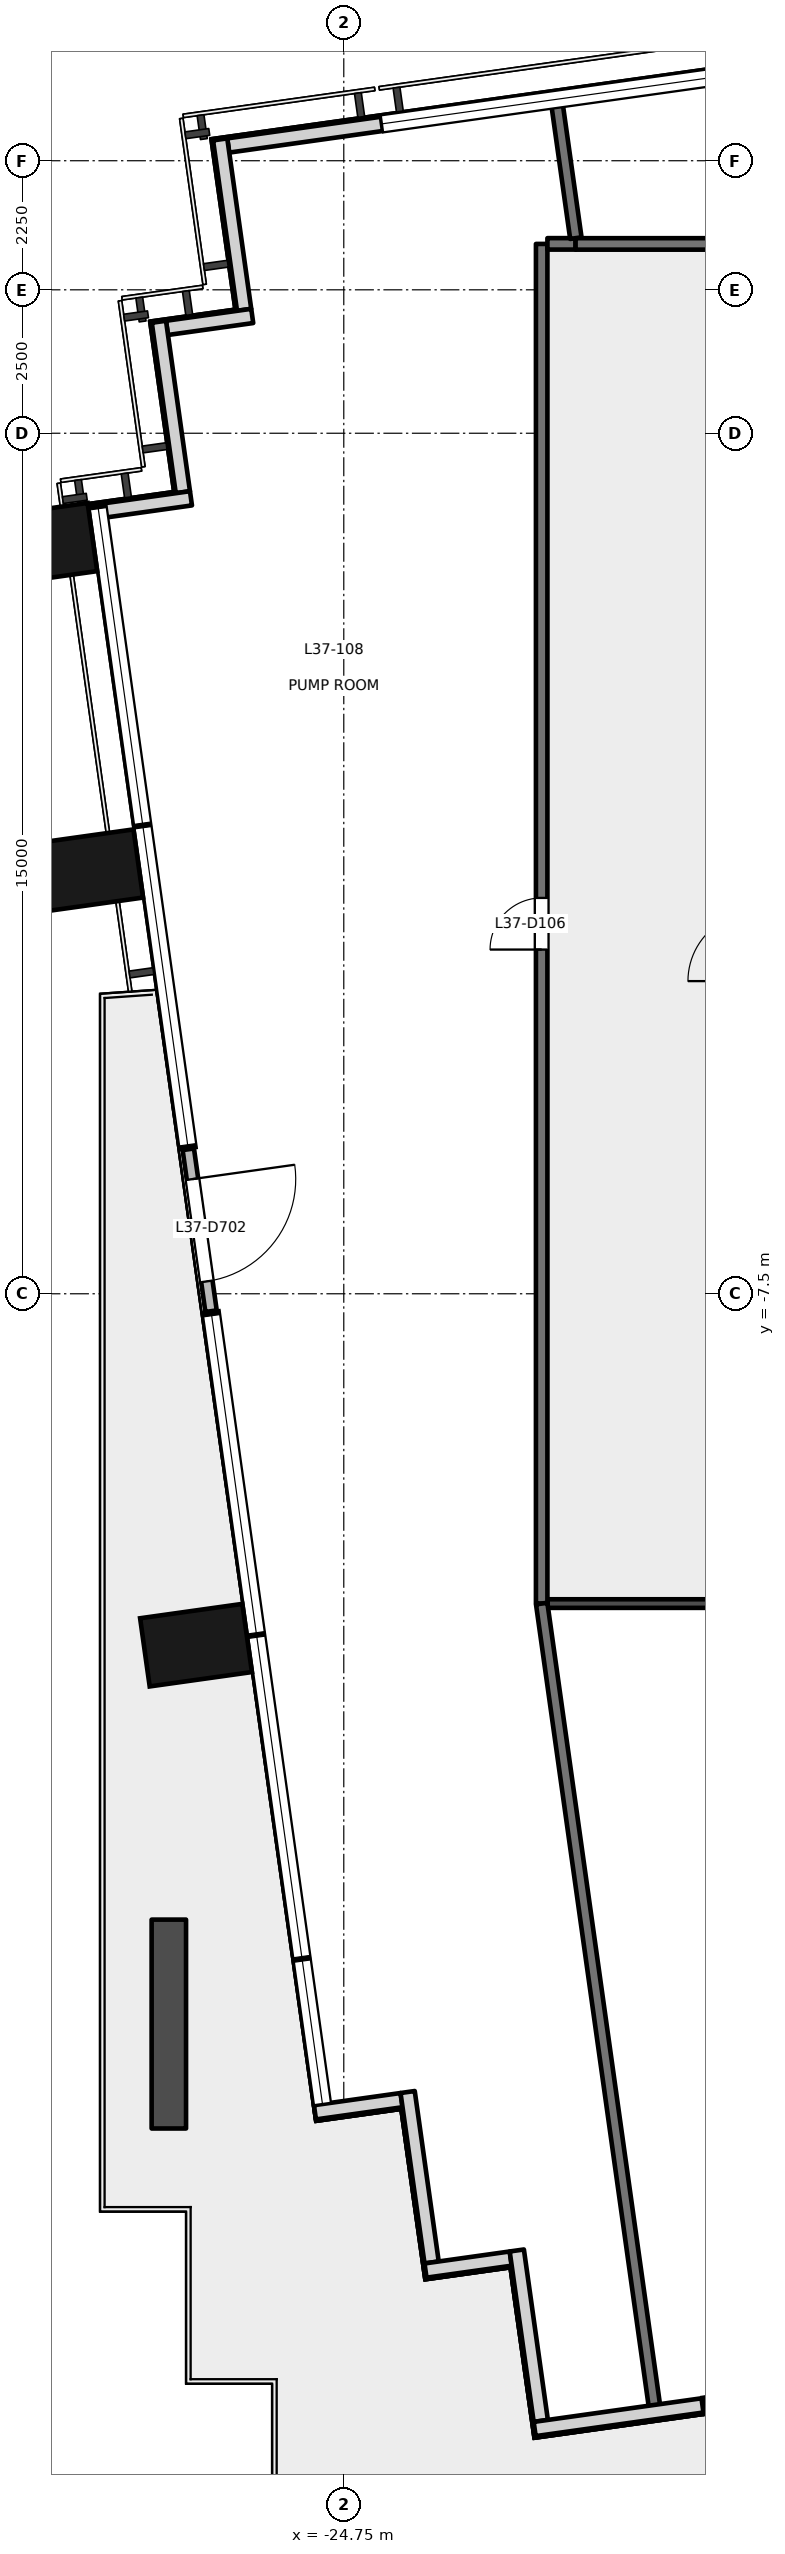
"""IFC4 building model, lengths in metres.
Left out: names, types, materials, properties, quantities, classifications, styles, units other than length and angle.
Written with IfcOpenShell. Run it as: python <this file> out.ifc"""

import sys

from ifc_helpers import new_model, si_unit, direction, frame, frame_2d, origin, origin_2d, place, context, subcontext, project, spatial, rectangle, extrude, element, fill, save


model = new_model("IFC4")
c1 = context("Model", 3, precision=1e-05, world=origin(), true_north=direction((0.0, 1.0)))
c2 = subcontext(c1, "Body", "Model", "MODEL_VIEW")
j1 = project(units=[si_unit("LENGTHUNIT", "METRE"), si_unit("PLANEANGLEUNIT", "RADIAN")], contexts=[c1])
p1 = place(None, origin())
s1 = spatial("IfcSite", under=j1, at=p1, CompositionType="ELEMENT")
p2 = place(p1, origin())
s2 = spatial("IfcBuilding", under=s1, at=p2, CompositionType="ELEMENT")
p3 = place(p2, frame((0.0, 0.0, 163.1)))
s3 = spatial("IfcBuildingStorey", under=s2, at=p3, CompositionType="ELEMENT", Elevation=163.1)
for number, where, z_axis, x_axis in (
    (1, (-27.326, -13.625, -0.2), (0.0, 0.0, 1.0), (-0.139, 0.99, 0.0)),
    (2, (-29.224, -0.125, -0.2), (0.0, 0.0, 1.0), (-0.139, 0.99, 0.0)),
    (3, (-30.024, 5.565, -0.2), (0.0, 0.0, 1.0), (-0.139, 0.99, 0.0)),
):
    element("IfcColumn", number, at=place(p3, frame(where, z_axis=z_axis, x_axis=x_axis)), inside=s3, PredefinedType="COLUMN", context=c2, shape_type="SweptSolid", body=[
        extrude(rectangle(XDim=1.2, YDim=1.8, at=origin_2d()), origin(), (0.0, 0.0, 1.0), 5.4),
    ])
p4 = place(p3, frame((-24.085, 12.893, 0.0), z_axis=(0.0, 0.0, 1.0), x_axis=(-0.990255800966, -0.139260362823, 0.0)))
e4 = element("IfcWall", 4, at=p4, inside=s3, PredefinedType="SOLIDWALL", context=c2, shape_type="SweptSolid", body=[
    extrude(rectangle(XDim=2.705, YDim=0.25, at=frame_2d((1.353, 0.0))), origin(), (0.0, 0.0, 1.0), 5.2),
])
p5 = place(p3, frame((-26.905, 12.622, 0.0), z_axis=(0.0, 0.0, 1.0), x_axis=(0.139313431826, -0.990248336385, 0.0)))
e5 = element("IfcWall", 5, at=p5, inside=s3, PredefinedType="SOLIDWALL", context=c2, shape_type="SweptSolid", body=[
    extrude(rectangle(XDim=3.0, YDim=0.25, at=frame_2d((1.5, 0.0))), origin(), (0.0, 0.0, 1.0), 5.2),
])
p6 = place(p3, frame((-26.346, 9.544, 0.0), z_axis=(0.0, 0.0, 1.0), x_axis=(-0.990368090482, -0.13845954411, 0.0)))
e6 = element("IfcWall", 6, at=p6, inside=s3, PredefinedType="SOLIDWALL", context=c2, shape_type="SweptSolid", body=[
    extrude(rectangle(XDim=1.5, YDim=0.25, at=frame_2d((0.75, 0.0))), origin(), (0.0, 0.0, 1.0), 5.2),
])
p7 = place(p3, frame((-27.973, 9.443, 0.0), z_axis=(0.0, 0.0, 1.0), x_axis=(0.139313431826, -0.990248336385, 0.0)))
e7 = element("IfcWall", 7, at=p7, inside=s3, PredefinedType="SOLIDWALL", context=c2, shape_type="SweptSolid", body=[
    extrude(rectangle(XDim=3.0, YDim=0.25, at=frame_2d((1.5, 0.0))), origin(), (0.0, 0.0, 1.0), 5.2),
])
p8 = place(p3, frame((-27.414, 6.366, 0.0), z_axis=(0.0, 0.0, 1.0), x_axis=(-0.990256286673, -0.139256908998, 0.0)))
e8 = element("IfcWall", 8, at=p8, inside=s3, PredefinedType="SOLIDWALL", context=c2, shape_type="SweptSolid", body=[
    extrude(rectangle(XDim=1.801, YDim=0.25, at=frame_2d((0.9, 0.0))), origin(), (0.0, 0.0, 1.0), 5.2),
])
p9 = place(p3, frame((-27.461, -4.981, 0.0), z_axis=(0.0, 0.0, 1.0), x_axis=(0.139202330076, -0.990263960417, 0.0)))
e9 = element("IfcWall", 9, at=p9, inside=s3, PredefinedType="SOLIDWALL", context=c2, shape_type="SweptSolid", body=[
    extrude(rectangle(XDim=2.85, YDim=0.2, at=frame_2d((1.425, 0.0))), origin(), (0.0, 0.0, 1.0), 4.1),
])
p10 = place(p9, frame((0.525, 0.0, 0.0)))
e10 = element("IfcOpeningElement", 10, at=p10, cuts=e9, PredefinedType="OPENING", context=c2, shape_type="SweptSolid", body=[
    extrude(rectangle(XDim=1.8, YDim=2.4, at=frame_2d((0.9, 1.2))), frame((0.0, 0.111, 0.0), z_axis=(0.0, -1.0, 0.0), x_axis=(1.0, 0.0, 0.0)), (0.0, 0.0, 1.0), 0.221),
])
p11 = place(p3, frame((-25.253, -21.768, 0.0), z_axis=(0.0, 0.0, 1.0), x_axis=(0.990248296447, 0.139313715703, 0.0)))
e11 = element("IfcWall", 11, at=p11, inside=s3, PredefinedType="SOLIDWALL", context=c2, shape_type="SweptSolid", body=[
    extrude(rectangle(XDim=1.525, YDim=0.25, at=frame_2d((0.762, 0.0))), origin(), (0.0, 0.0, 1.0), 5.2),
])
p12 = place(p3, frame((-23.637, -21.414, 0.0), z_axis=(0.0, 0.0, 1.0), x_axis=(0.139313431826, -0.990248336385, 0.0)))
e12 = element("IfcWall", 12, at=p12, inside=s3, PredefinedType="SOLIDWALL", context=c2, shape_type="SweptSolid", body=[
    extrude(rectangle(XDim=3.0, YDim=0.25, at=frame_2d((1.5, 0.0))), origin(), (0.0, 0.0, 1.0), 5.2),
])
p13 = place(p3, frame((-23.325, -24.526, 0.0), z_axis=(0.0, 0.0, 1.0), x_axis=(0.990243596651, 0.13934711799, 0.0)))
e13 = element("IfcWall", 13, at=p13, inside=s3, PredefinedType="SOLIDWALL", context=c2, shape_type="SweptSolid", body=[
    extrude(rectangle(XDim=1.5, YDim=0.25, at=frame_2d((0.75, 0.0))), origin(), (0.0, 0.0, 1.0), 5.2),
])
p14 = place(p3, frame((-21.734, -24.176, 0.0), z_axis=(0.0, 0.0, 1.0), x_axis=(0.139313431826, -0.990248336385, 0.0)))
e14 = element("IfcWall", 14, at=p14, inside=s3, PredefinedType="SOLIDWALL", context=c2, shape_type="SweptSolid", body=[
    extrude(rectangle(XDim=3.0, YDim=0.25, at=frame_2d((1.5, 0.0))), origin(), (0.0, 0.0, 1.0), 5.2),
])
p15 = place(p3, frame((-21.422, -27.288, 0.0), z_axis=(0.0, 0.0, 1.0), x_axis=(0.990246427036, 0.139327002919, 0.0)))
e15 = element("IfcWall", 15, at=p15, inside=s3, PredefinedType="SOLIDWALL", context=c2, shape_type="SweptSolid", body=[
    extrude(rectangle(XDim=2.954, YDim=0.25, at=frame_2d((1.477, 0.0))), origin(), (0.0, 0.0, 1.0), 5.2),
])
p16 = place(p3, frame((-27.8, -22.05, 0.0), z_axis=(0.0, 0.0, 1.0), x_axis=(0.0, 1.0, 0.0)))
e16 = element("IfcWall", 16, at=p16, inside=s3, PredefinedType="SOLIDWALL", context=c2, shape_type="SweptSolid", body=[
    extrude(rectangle(XDim=3.641, YDim=0.6, at=frame_2d((1.821, 0.0))), origin(), (0.0, 0.0, 1.0), 0.7),
])
p17 = place(p3, frame((-1.94, -12.9, 0.0), z_axis=(0.0, 0.0, 1.0), x_axis=(-1.0, 0.0, 0.0)))
e17 = element("IfcWall", 17, at=p17, inside=s3, PredefinedType="PARTITIONING", context=c2, shape_type="SweptSolid", body=[
    extrude(rectangle(XDim=19.26, YDim=0.15, at=frame_2d((9.63, 0.0))), origin(), (0.0, 0.0, 1.0), 4.3),
])
p18 = place(p17, frame((4.49, 0.0, 0.0)))
e18 = element("IfcOpeningElement", 18, at=p18, cuts=e17, PredefinedType="OPENING", context=c2, shape_type="SweptSolid", body=[
    extrude(rectangle(XDim=1.8, YDim=2.1, at=frame_2d((0.9, 1.05))), frame((0.0, 0.085, 0.0), z_axis=(0.0, -1.0, 0.0), x_axis=(1.0, 0.0, 0.0)), (0.0, 0.0, 1.0), 0.171),
])
p19 = place(p17, frame((11.568, 0.0, 0.0)))
e19 = element("IfcOpeningElement", 19, at=p19, cuts=e17, PredefinedType="OPENING", context=c2, shape_type="SweptSolid", body=[
    extrude(rectangle(XDim=2.4, YDim=2.4, at=frame_2d((1.2, 1.2))), frame((0.0, 0.085, 0.0), z_axis=(0.0, -1.0, 0.0), x_axis=(1.0, 0.0, 0.0)), (0.0, 0.0, 1.0), 0.171),
])
p20 = place(p3, frame((-21.3, -12.9, 0.0), z_axis=(0.0, 0.0, 1.0), x_axis=(0.0, 1.0, 0.0)))
e20 = element("IfcWall", 20, at=p20, inside=s3, PredefinedType="PARTITIONING", context=c2, shape_type="SweptSolid", body=[
    extrude(rectangle(XDim=23.7, YDim=0.2, at=frame_2d((11.85, 0.0))), origin(), (0.0, 0.0, 1.0), 4.7),
])
p21 = place(p20, frame((11.4, 0.0, 0.0)))
e21 = element("IfcOpeningElement", 21, at=p21, cuts=e20, PredefinedType="OPENING", context=c2, shape_type="SweptSolid", body=[
    extrude(rectangle(XDim=0.9, YDim=2.1, at=frame_2d((0.45, 1.05))), frame((0.0, 0.111, 0.0), z_axis=(0.0, -1.0, 0.0), x_axis=(1.0, 0.0, 0.0)), (0.0, 0.0, 1.0), 0.221),
])
p22 = place(p3, frame((-21.2, 10.801, 0.0), z_axis=(0.0, 0.0, 1.0), x_axis=(1.0, 0.0, 0.0)))
e22 = element("IfcWall", 22, at=p22, inside=s3, PredefinedType="PARTITIONING", context=c2, shape_type="SweptSolid", body=[
    extrude(rectangle(XDim=0.491, YDim=0.2, at=frame_2d((0.246, 0.0))), origin(), (0.0, 0.0, 1.0), 5.2),
])
p23 = place(p3, frame((-20.709, 10.8, 0.0), z_axis=(0.0, 0.0, 1.0), x_axis=(1.0, 0.0, 0.0)))
e23 = element("IfcWall", 23, at=p23, inside=s3, PredefinedType="PARTITIONING", context=c2, shape_type="SweptSolid", body=[
    extrude(rectangle(XDim=15.548, YDim=0.2, at=frame_2d((7.774, 0.0))), origin(), (0.0, 0.0, 1.0), 4.8),
])
p24 = place(p23, frame((7.324, 0.0, 0.0)))
e24 = element("IfcOpeningElement", 24, at=p24, cuts=e23, PredefinedType="OPENING", context=c2, shape_type="SweptSolid", body=[
    extrude(rectangle(XDim=0.9, YDim=2.1, at=frame_2d((0.45, 1.05))), frame((0.0, 0.111, 0.0), z_axis=(0.0, -1.0, 0.0), x_axis=(1.0, 0.0, 0.0)), (0.0, 0.0, 1.0), 0.221),
])
p25 = place(p3, frame((-19.332, -26.903, 0.0), z_axis=(0.0, 0.0, 1.0), x_axis=(-0.139173089853, 0.990268070303, 0.0)))
e25 = element("IfcWall", 25, at=p25, inside=s3, PredefinedType="PARTITIONING", context=c2, shape_type="SweptSolid", body=[
    extrude(rectangle(XDim=14.141, YDim=0.2, at=frame_2d((7.07, 0.0))), origin(), (0.0, 0.0, 1.0), 5.2),
])
p26 = place(p3, frame((-21.032, 13.231, 0.0), z_axis=(0.0, 0.0, 1.0), x_axis=(0.139343856524, -0.990244055599, 0.0)))
e26 = element("IfcWall", 26, at=p26, inside=s3, PredefinedType="PARTITIONING", context=c2, shape_type="SweptSolid", body=[
    extrude(rectangle(XDim=2.353, YDim=0.2, at=frame_2d((1.177, 0.0))), origin(), (0.0, 0.0, 1.0), 5.2),
])
p27 = place(p10, origin())
e27 = element("IfcDoor", 27, at=p27, inside=s3, OperationType="DOUBLE_DOOR_SINGLE_SWING", PredefinedType="DOOR", context=c2, shape_type="SweptSolid", body=[
    extrude(rectangle(XDim=1.8, YDim=2.4, at=frame_2d((0.9, 1.2))), frame((0.0, 0.025, 0.0), z_axis=(0.0, -1.0, 0.0), x_axis=(1.0, 0.0, 0.0)), (0.0, 0.0, 1.0), 0.05),
])
fill(e10, e27)
p28 = place(p21, origin())
e28 = element("IfcDoor", 28, at=p28, inside=s3, OperationType="SINGLE_SWING_LEFT", PredefinedType="DOOR", context=c2, shape_type="SweptSolid", body=[
    extrude(rectangle(XDim=0.9, YDim=2.1, at=frame_2d((0.45, 1.05))), frame((0.0, 0.025, 0.0), z_axis=(0.0, -1.0, 0.0), x_axis=(1.0, 0.0, 0.0)), (0.0, 0.0, 1.0), 0.05),
])
fill(e21, e28)
save(model, sys.argv[1])
